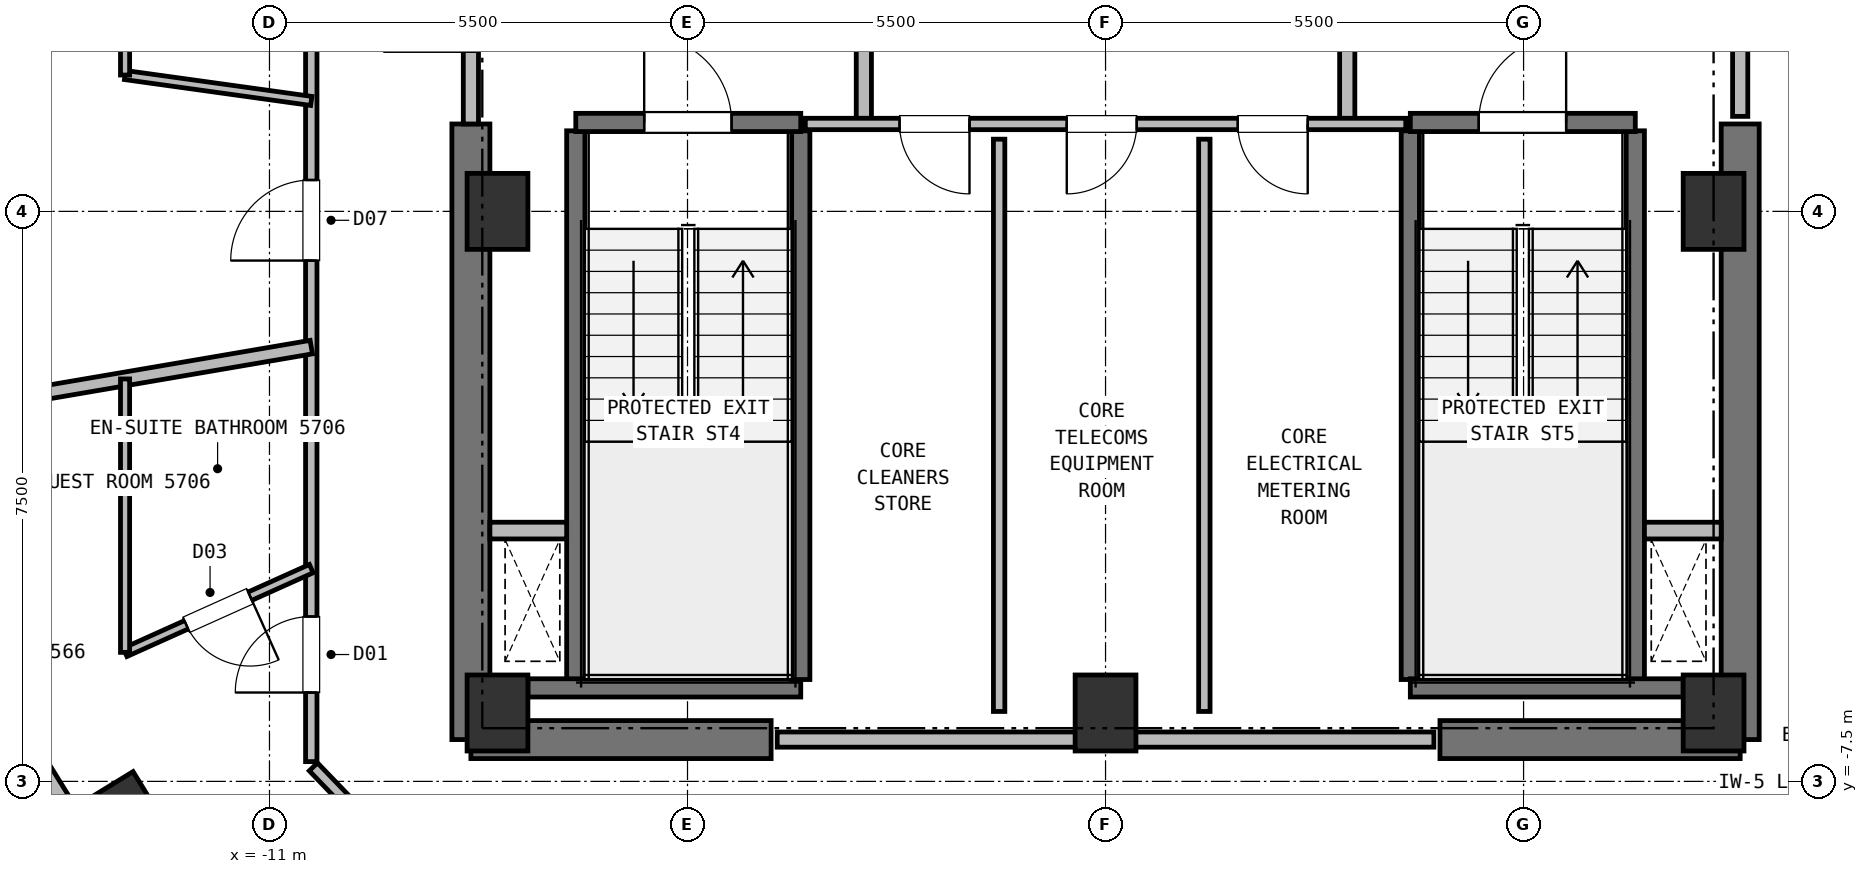
"""IFC4 building model, lengths in metres.
Left out: names, types, materials, properties, quantities, classifications, styles, units other than length and angle.
Written with IfcOpenShell. Run it as: python <this file> out.ifc"""

import sys

from ifc_helpers import new_model, si_unit, direction, frame, frame_2d, origin, origin_2d, place, context, subcontext, project, spatial, rectangle, extrude, element, fill, save


model = new_model("IFC4")
c1 = context("Model", 3, precision=1e-05, world=origin(), true_north=direction((0.0, 1.0)))
c2 = subcontext(c1, "Body", "Model", "MODEL_VIEW")
j1 = project(units=[si_unit("LENGTHUNIT", "METRE"), si_unit("PLANEANGLEUNIT", "RADIAN")], contexts=[c1])
p1 = place(None, origin())
s1 = spatial("IfcSite", under=j1, at=p1, CompositionType="ELEMENT")
p2 = place(p1, origin())
s2 = spatial("IfcBuilding", under=s1, at=p2, CompositionType="ELEMENT")
p3 = place(p2, frame((0.0, 0.0, 216.95)))
s3 = spatial("IfcBuildingStorey", under=s2, at=p3, CompositionType="ELEMENT", Elevation=216.95)
for number, where, z_axis, x_axis in (
    (1, (-8.0, -6.6, 0.0), (0.0, 0.0, 1.0), (1.0, 0.0, 0.0)),
    (2, (0.0, -6.6, 0.0), (0.0, 0.0, 1.0), (1.0, 0.0, 0.0)),
    (3, (8.0, -6.6, 0.0), (0.0, 0.0, 1.0), (1.0, 0.0, 0.0)),
    (4, (8.0, 0.0, 0.0), (0.0, 0.0, 1.0), (1.0, 0.0, 0.0)),
    (5, (-8.0, 0.0, 0.0), (0.0, 0.0, 1.0), (1.0, 0.0, 0.0)),
):
    element("IfcColumn", number, at=place(p3, frame(where, z_axis=z_axis, x_axis=x_axis)), inside=s3, PredefinedType="COLUMN", context=c2, shape_type="SweptSolid", body=[
        extrude(rectangle(XDim=0.8, YDim=1.0, at=origin_2d()), origin(), (0.0, 0.0, 1.0), 3.8),
    ])
for number, where, z_axis, x_axis in (
    (6, (-8.35, -6.95, 0.0), (0.0, 0.0, 1.0), (1.0, 0.0, 0.0)),
    (7, (4.4, -6.95, 0.0), (0.0, 0.0, 1.0), (1.0, 0.0, 0.0)),
):
    element("IfcWall", number, at=place(p3, frame(where, z_axis=z_axis, x_axis=x_axis)), inside=s3, PredefinedType="SHEAR", context=c2, shape_type="SweptSolid", body=[
        extrude(rectangle(XDim=3.95, YDim=0.5, at=frame_2d((1.975, 0.0))), origin(), (0.0, 0.0, 1.0), 3.55),
    ])
for number, where, z_axis, x_axis in (
    (8, (-8.35, -6.95, 0.0), (0.0, 0.0, 1.0), (0.0, 1.0, 0.0)),
    (9, (8.35, -6.95, 0.0), (0.0, 0.0, 1.0), (0.0, 1.0, 0.0)),
):
    element("IfcWall", number, at=place(p3, frame(where, z_axis=z_axis, x_axis=x_axis)), inside=s3, PredefinedType="SHEAR", context=c2, shape_type="SweptSolid", body=[
        extrude(rectangle(XDim=8.1, YDim=0.5, at=frame_2d((4.05, 0.0))), origin(), (0.0, 0.0, 1.0), 3.55),
    ])
p4 = place(p3, frame((-13.012, -7.974, 0.0), z_axis=(0.0, 0.0, 1.0), x_axis=(-0.522498564716, 0.852640164354, 0.0)))
e10 = element("IfcColumn", 10, at=p4, inside=s3, PredefinedType="COLUMN", context=c2, shape_type="SweptSolid", body=[
    extrude(rectangle(XDim=0.8, YDim=1.0, at=origin_2d()), origin(), (0.0, 0.0, 1.0), 3.8),
])
p5 = place(p3, frame((-13.25, -8.634, 0.0), z_axis=(0.0, 0.0, 1.0), x_axis=(-0.526908054593, 0.849922291745, 0.0)))
e11 = element("IfcWall", 11, at=p5, inside=s3, PredefinedType="SOLIDWALL", context=c2, shape_type="SweptSolid", body=[
    extrude(rectangle(XDim=2.566, YDim=0.33, at=frame_2d((1.283, 0.0))), origin(), (0.0, 0.0, 1.0), 3.55),
])
p6 = place(p3, frame((-6.97, -6.16, 0.0), z_axis=(0.0, 0.0, 1.0), x_axis=(0.0, 1.0, 0.0)))
e12 = element("IfcWall", 12, at=p6, inside=s3, PredefinedType="SHEAR", context=c2, shape_type="SweptSolid", body=[
    extrude(rectangle(XDim=7.22, YDim=0.24, at=frame_2d((3.61, 0.0))), origin(), (0.0, 0.0, 1.0), 3.55),
])
p7 = place(p3, frame((-7.6, -6.27, 0.0), z_axis=(0.0, 0.0, 1.0), x_axis=(1.0, 0.0, 0.0)))
e13 = element("IfcWall", 13, at=p7, inside=s3, PredefinedType="SHEAR", context=c2, shape_type="SweptSolid", body=[
    extrude(rectangle(XDim=3.59, YDim=0.24, at=frame_2d((1.795, 0.0))), origin(), (0.0, 0.0, 1.0), 3.55),
])
p8 = place(p3, frame((-4.01, -6.16, 0.0), z_axis=(0.0, 0.0, 1.0), x_axis=(0.0, 1.0, 0.0)))
e14 = element("IfcWall", 14, at=p8, inside=s3, PredefinedType="SHEAR", context=c2, shape_type="SweptSolid", body=[
    extrude(rectangle(XDim=7.22, YDim=0.24, at=frame_2d((3.61, 0.0))), origin(), (0.0, 0.0, 1.0), 3.55),
])
p9 = place(p3, frame((-6.97, 1.17, 0.0), z_axis=(0.0, 0.0, 1.0), x_axis=(1.0, 0.0, 0.0)))
e15 = element("IfcWall", 15, at=p9, inside=s3, PredefinedType="SHEAR", context=c2, shape_type="SweptSolid", body=[
    extrude(rectangle(XDim=2.96, YDim=0.24, at=frame_2d((1.48, 0.0))), origin(), (0.0, 0.0, 1.0), 3.55),
])
p10 = place(p9, frame((0.9, 0.0, 0.0)))
e16 = element("IfcOpeningElement", 16, at=p10, cuts=e15, PredefinedType="OPENING", context=c2, shape_type="SweptSolid", body=[
    extrude(rectangle(XDim=1.15, YDim=2.15, at=frame_2d((0.575, 1.075))), frame((0.0, 0.13, 0.0), z_axis=(0.0, -1.0, 0.0), x_axis=(1.0, 0.0, 0.0)), (0.0, 0.0, 1.0), 0.26),
])
for number, where, z_axis, x_axis in (
    (17, (4.01, -6.16, 0.0), (0.0, 0.0, 1.0), (0.0, 1.0, 0.0)),
    (18, (6.97, -6.16, 0.0), (0.0, 0.0, 1.0), (0.0, 1.0, 0.0)),
):
    element("IfcWall", number, at=place(p3, frame(where, z_axis=z_axis, x_axis=x_axis)), inside=s3, PredefinedType="SHEAR", context=c2, shape_type="SweptSolid", body=[
        extrude(rectangle(XDim=7.22, YDim=0.24, at=frame_2d((3.61, 0.0))), origin(), (0.0, 0.0, 1.0), 3.55),
    ])
p11 = place(p3, frame((4.01, -6.27, 0.0), z_axis=(0.0, 0.0, 1.0), x_axis=(1.0, 0.0, 0.0)))
e19 = element("IfcWall", 19, at=p11, inside=s3, PredefinedType="SHEAR", context=c2, shape_type="SweptSolid", body=[
    extrude(rectangle(XDim=3.59, YDim=0.24, at=frame_2d((1.795, 0.0))), origin(), (0.0, 0.0, 1.0), 3.55),
])
p12 = place(p3, frame((4.01, 1.17, 0.0), z_axis=(0.0, 0.0, 1.0), x_axis=(1.0, 0.0, 0.0)))
e20 = element("IfcWall", 20, at=p12, inside=s3, PredefinedType="SHEAR", context=c2, shape_type="SweptSolid", body=[
    extrude(rectangle(XDim=2.96, YDim=0.24, at=frame_2d((1.48, 0.0))), origin(), (0.0, 0.0, 1.0), 3.55),
])
p13 = place(p12, frame((0.9, 0.0, 0.0)))
e21 = element("IfcOpeningElement", 21, at=p13, cuts=e20, PredefinedType="OPENING", context=c2, shape_type="SweptSolid", body=[
    extrude(rectangle(XDim=1.15, YDim=2.15, at=frame_2d((0.575, 1.075))), frame((0.0, 0.13, 0.0), z_axis=(0.0, -1.0, 0.0), x_axis=(1.0, 0.0, 0.0)), (0.0, 0.0, 1.0), 0.26),
])
for number, where, z_axis, x_axis in (
    (22, (-8.1, -4.2, 0.0), (0.0, 0.0, 1.0), (1.0, 0.0, 0.0)),
    (23, (7.09, -4.2, 0.0), (0.0, 0.0, 1.0), (1.0, 0.0, 0.0)),
):
    element("IfcWall", number, at=place(p3, frame(where, z_axis=z_axis, x_axis=x_axis)), inside=s3, PredefinedType="PARTITIONING", context=c2, shape_type="SweptSolid", body=[
        extrude(rectangle(XDim=1.01, YDim=0.22, at=frame_2d((0.505, 0.0))), origin(), (0.0, 0.0, 1.0), 3.55),
    ])
p14 = place(p3, frame((-3.18, 1.15, 0.0), z_axis=(0.0, 0.0, 1.0), x_axis=(0.0, 1.0, 0.0)))
e24 = element("IfcWall", 24, at=p14, inside=s3, PredefinedType="PARTITIONING", context=c2, shape_type="SweptSolid", body=[
    extrude(rectangle(XDim=3.3, YDim=0.2, at=frame_2d((1.65, 0.0))), origin(), (0.0, 0.0, 1.0), 3.55),
])
p15 = place(p14, frame((1.08, 0.0, 0.0)))
e25 = element("IfcOpeningElement", 25, at=p15, cuts=e24, PredefinedType="OPENING", context=c2, shape_type="SweptSolid", body=[
    extrude(rectangle(XDim=1.15, YDim=2.15, at=frame_2d((0.575, 1.075))), frame((0.0, 0.11, 0.0), z_axis=(0.0, -1.0, 0.0), x_axis=(1.0, 0.0, 0.0)), (0.0, 0.0, 1.0), 0.22),
])
p16 = place(p3, frame((3.18, 1.15, 0.0), z_axis=(0.0, 0.0, 1.0), x_axis=(0.0, 1.0, 0.0)))
e26 = element("IfcWall", 26, at=p16, inside=s3, PredefinedType="PARTITIONING", context=c2, shape_type="SweptSolid", body=[
    extrude(rectangle(XDim=3.3, YDim=0.2, at=frame_2d((1.65, 0.0))), origin(), (0.0, 0.0, 1.0), 3.55),
])
p17 = place(p16, frame((1.08, 0.0, 0.0)))
e27 = element("IfcOpeningElement", 27, at=p17, cuts=e26, PredefinedType="OPENING", context=c2, shape_type="SweptSolid", body=[
    extrude(rectangle(XDim=1.15, YDim=2.15, at=frame_2d((0.575, 1.075))), frame((0.0, 0.11, 0.0), z_axis=(0.0, -1.0, 0.0), x_axis=(1.0, 0.0, 0.0)), (0.0, 0.0, 1.0), 0.22),
])
p18 = place(p3, frame((-8.35, 1.15, 0.0), z_axis=(0.0, 0.0, 1.0), x_axis=(0.0, 1.0, 0.0)))
e28 = element("IfcWall", 28, at=p18, inside=s3, PredefinedType="PARTITIONING", context=c2, shape_type="SweptSolid", body=[
    extrude(rectangle(XDim=5.4, YDim=0.2, at=frame_2d((2.7, 0.0))), origin(), (0.0, 0.0, 1.0), 3.55),
])
p19 = place(p18, frame((0.95, 0.0, 0.0)))
e29 = element("IfcOpeningElement", 29, at=p19, cuts=e28, PredefinedType="OPENING", context=c2, shape_type="SweptSolid", body=[
    extrude(rectangle(XDim=1.15, YDim=2.15, at=frame_2d((0.575, 1.075))), frame((0.0, 0.11, 0.0), z_axis=(0.0, -1.0, 0.0), x_axis=(1.0, 0.0, 0.0)), (0.0, 0.0, 1.0), 0.22),
])
p20 = place(p3, frame((8.35, 1.25, 0.0), z_axis=(0.0, 0.0, 1.0), x_axis=(0.0, 1.0, 0.0)))
e30 = element("IfcWall", 30, at=p20, inside=s3, PredefinedType="PARTITIONING", context=c2, shape_type="SweptSolid", body=[
    extrude(rectangle(XDim=5.3, YDim=0.2, at=frame_2d((2.65, 0.0))), origin(), (0.0, 0.0, 1.0), 3.55),
])
p21 = place(p20, frame((0.95, 0.0, 0.0)))
e31 = element("IfcOpeningElement", 31, at=p21, cuts=e30, PredefinedType="OPENING", context=c2, shape_type="SweptSolid", body=[
    extrude(rectangle(XDim=1.15, YDim=2.15, at=frame_2d((0.575, 1.075))), frame((0.0, 0.11, 0.0), z_axis=(0.0, -1.0, 0.0), x_axis=(1.0, 0.0, 0.0)), (0.0, 0.0, 1.0), 0.22),
])
p22 = place(p3, frame((3.95, 1.15, 0.0), z_axis=(0.0, 0.0, 1.0), x_axis=(-1.0, 0.0, 0.0)))
e32 = element("IfcWall", 32, at=p22, inside=s3, PredefinedType="PARTITIONING", context=c2, shape_type="SweptSolid", body=[
    extrude(rectangle(XDim=7.9, YDim=0.15, at=frame_2d((3.95, 0.0))), origin(), (0.0, 0.0, 1.0), 3.55),
])
p23 = place(p22, frame((5.74, 0.0, 0.0)))
e33 = element("IfcOpeningElement", 33, at=p23, cuts=e32, PredefinedType="OPENING", context=c2, shape_type="SweptSolid", body=[
    extrude(rectangle(XDim=0.92, YDim=2.05, at=frame_2d((0.46, 1.025))), frame((0.0, 0.085, 0.0), z_axis=(0.0, -1.0, 0.0), x_axis=(1.0, 0.0, 0.0)), (0.0, 0.0, 1.0), 0.17),
])
p24 = place(p22, frame((3.54, 0.0, 0.0)))
e34 = element("IfcOpeningElement", 34, at=p24, cuts=e32, PredefinedType="OPENING", context=c2, shape_type="SweptSolid", body=[
    extrude(rectangle(XDim=0.92, YDim=2.05, at=frame_2d((0.46, 1.025))), frame((0.0, 0.085, 0.0), z_axis=(0.0, -1.0, 0.0), x_axis=(1.0, 0.0, 0.0)), (0.0, 0.0, 1.0), 0.17),
])
p25 = place(p22, frame((1.29, 0.0, 0.0)))
e35 = element("IfcOpeningElement", 35, at=p25, cuts=e32, PredefinedType="OPENING", context=c2, shape_type="SweptSolid", body=[
    extrude(rectangle(XDim=0.92, YDim=2.05, at=frame_2d((0.46, 1.025))), frame((0.0, 0.085, 0.0), z_axis=(0.0, -1.0, 0.0), x_axis=(1.0, 0.0, 0.0)), (0.0, 0.0, 1.0), 0.17),
])
p26 = place(p3, frame((-4.32, -6.95, 0.0), z_axis=(0.0, 0.0, 1.0), x_axis=(1.0, 0.0, 0.0)))
e36 = element("IfcWall", 36, at=p26, inside=s3, PredefinedType="PARTITIONING", context=c2, shape_type="SweptSolid", body=[
    extrude(rectangle(XDim=8.64, YDim=0.2, at=frame_2d((4.32, 0.0))), origin(), (0.0, 0.0, 1.0), 3.55),
])
for number, where, z_axis, x_axis in (
    (37, (-1.4, -6.58, 0.0), (0.0, 0.0, 1.0), (0.0, 1.0, 0.0)),
    (38, (1.3, -6.58, 0.0), (0.0, 0.0, 1.0), (0.0, 1.0, 0.0)),
):
    element("IfcWall", number, at=place(p3, frame(where, z_axis=z_axis, x_axis=x_axis)), inside=s3, PredefinedType="PARTITIONING", context=c2, shape_type="SweptSolid", body=[
        extrude(rectangle(XDim=7.53, YDim=0.15, at=frame_2d((3.765, 0.0))), origin(), (0.0, 0.0, 1.0), 3.55),
    ])
p27 = place(p3, frame((10.422, -7.309, 0.0), z_axis=(0.0, 0.0, 1.0), x_axis=(-0.693764562202, -0.720201869085, 0.0)))
e39 = element("IfcWall", 39, at=p27, inside=s3, PredefinedType="PARTITIONING", context=c2, shape_type="SweptSolid", body=[
    extrude(rectangle(XDim=2.558, YDim=0.15, at=frame_2d((1.279, 0.0))), origin(), (0.0, 0.0, 1.0), 3.23),
])
p28 = place(p3, frame((-10.45, -7.24, 0.0), z_axis=(0.0, 0.0, 1.0), x_axis=(0.0, 1.0, 0.0)))
e40 = element("IfcWall", 40, at=p28, inside=s3, PredefinedType="PARTITIONING", context=c2, shape_type="SweptSolid", body=[
    extrude(rectangle(XDim=14.48, YDim=0.15, at=frame_2d((7.24, 0.0))), origin(), (0.0, 0.0, 1.0), 3.23),
])
p29 = place(p28, frame((0.909, 0.0, 0.0)))
e41 = element("IfcOpeningElement", 41, at=p29, cuts=e40, PredefinedType="OPENING", context=c2, shape_type="SweptSolid", body=[
    extrude(rectangle(XDim=1.0, YDim=2.15, at=frame_2d((0.5, 1.075))), frame((0.0, 0.085, 0.0), z_axis=(0.0, -1.0, 0.0), x_axis=(1.0, 0.0, 0.0)), (0.0, 0.0, 1.0), 0.17),
])
p30 = place(p28, frame((6.593, 0.0, 0.0)))
e42 = element("IfcOpeningElement", 42, at=p30, cuts=e40, PredefinedType="OPENING", context=c2, shape_type="SweptSolid", body=[
    extrude(rectangle(XDim=1.06, YDim=2.15, at=frame_2d((0.53, 1.075))), frame((0.0, 0.085, 0.0), z_axis=(0.0, -1.0, 0.0), x_axis=(1.0, 0.0, 0.0)), (0.0, 0.0, 1.0), 0.17),
])
p31 = place(p28, frame((12.49, 0.0, 0.0)))
e43 = element("IfcOpeningElement", 43, at=p31, cuts=e40, PredefinedType="OPENING", context=c2, shape_type="SweptSolid", body=[
    extrude(rectangle(XDim=1.06, YDim=2.15, at=frame_2d((0.53, 1.075))), frame((0.0, 0.085, 0.0), z_axis=(0.0, -1.0, 0.0), x_axis=(1.0, 0.0, 0.0)), (0.0, 0.0, 1.0), 0.17),
])
p32 = place(p3, frame((-8.648, -9.151, 0.0), z_axis=(0.0, 0.0, 1.0), x_axis=(-0.693764562202, 0.720201869085, 0.0)))
e44 = element("IfcWall", 44, at=p32, inside=s3, PredefinedType="PARTITIONING", context=c2, shape_type="SweptSolid", body=[
    extrude(rectangle(XDim=2.558, YDim=0.15, at=frame_2d((1.279, 0.0))), origin(), (0.0, 0.0, 1.0), 3.23),
])
p33 = place(p3, frame((-12.9, 1.794, 0.0), z_axis=(0.0, 0.0, 1.0), x_axis=(0.990475454298, -0.137689412929, 0.0)))
e45 = element("IfcWall", 45, at=p33, inside=s3, PredefinedType="PARTITIONING", context=c2, shape_type="SweptSolid", body=[
    extrude(rectangle(XDim=2.473, YDim=0.12, at=frame_2d((1.237, 0.0))), origin(), (0.0, 0.0, 1.0), 3.55),
])
p34 = place(p3, frame((-12.9, 1.794, 0.0), z_axis=(0.0, 0.0, 1.0), x_axis=(0.0, 1.0, 0.0)))
e46 = element("IfcWall", 46, at=p34, inside=s3, PredefinedType="PARTITIONING", context=c2, shape_type="SweptSolid", body=[
    extrude(rectangle(XDim=3.661, YDim=0.12, at=frame_2d((1.831, 0.0))), origin(), (0.0, 0.0, 1.0), 3.55),
])
p35 = place(p34, frame((1.371, 0.0, 0.0)))
e47 = element("IfcOpeningElement", 47, at=p35, cuts=e46, PredefinedType="OPENING", context=c2, shape_type="SweptSolid", body=[
    extrude(rectangle(XDim=0.92, YDim=2.1, at=frame_2d((0.46, 1.05))), frame((0.0, 0.07, 0.0), z_axis=(0.0, -1.0, 0.0), x_axis=(1.0, 0.0, 0.0)), (0.0, 0.0, 1.0), 0.14),
])
p36 = place(p3, frame((-10.45, -1.786, 0.0), z_axis=(0.0, 0.0, 1.0), x_axis=(-0.985707903362, -0.168463435946, 0.0)))
e48 = element("IfcWall", 48, at=p36, inside=s3, PredefinedType="PARTITIONING", context=c2, shape_type="SweptSolid", body=[
    extrude(rectangle(XDim=6.203, YDim=0.18, at=frame_2d((3.101, 0.0))), origin(), (0.0, 0.0, 1.0), 3.55),
])
p37 = place(p3, frame((-10.45, -4.7, 0.0), z_axis=(0.0, 0.0, 1.0), x_axis=(-0.911981011606, -0.410232415186, 0.0)))
e49 = element("IfcWall", 49, at=p37, inside=s3, PredefinedType="PARTITIONING", context=c2, shape_type="SweptSolid", body=[
    extrude(rectangle(XDim=2.687, YDim=0.12, at=frame_2d((1.343, 0.0))), origin(), (0.0, 0.0, 1.0), 3.55),
])
p38 = place(p37, frame((0.883, 0.0, 0.0)))
e50 = element("IfcOpeningElement", 50, at=p38, cuts=e49, PredefinedType="OPENING", context=c2, shape_type="SweptSolid", body=[
    extrude(rectangle(XDim=0.92, YDim=2.1, at=frame_2d((0.46, 1.05))), frame((0.0, 0.07, 0.0), z_axis=(0.0, -1.0, 0.0), x_axis=(1.0, 0.0, 0.0)), (0.0, 0.0, 1.0), 0.14),
])
p39 = place(p3, frame((-12.9, -2.205, 0.0), z_axis=(0.0, 0.0, 1.0), x_axis=(0.0, -1.0, 0.0)))
e51 = element("IfcWall", 51, at=p39, inside=s3, PredefinedType="PARTITIONING", context=c2, shape_type="SweptSolid", body=[
    extrude(rectangle(XDim=3.598, YDim=0.12, at=frame_2d((1.799, 0.0))), origin(), (0.0, 0.0, 1.0), 3.23),
])
p40 = place(p10, origin())
e52 = element("IfcDoor", 52, at=p40, inside=s3, OperationType="SINGLE_SWING_LEFT", PredefinedType="DOOR", context=c2, shape_type="SweptSolid", body=[
    extrude(rectangle(XDim=1.15, YDim=2.15, at=frame_2d((0.575, 1.075))), frame((0.0, 0.025, 0.0), z_axis=(0.0, -1.0, 0.0), x_axis=(1.0, 0.0, 0.0)), (0.0, 0.0, 1.0), 0.05),
])
fill(e16, e52)
p41 = place(p13, origin())
e53 = element("IfcDoor", 53, at=p41, inside=s3, OperationType="SINGLE_SWING_RIGHT", PredefinedType="DOOR", context=c2, shape_type="SweptSolid", body=[
    extrude(rectangle(XDim=1.15, YDim=2.15, at=frame_2d((0.575, 1.075))), frame((0.0, 0.025, 0.0), z_axis=(0.0, -1.0, 0.0), x_axis=(1.0, 0.0, 0.0)), (0.0, 0.0, 1.0), 0.05),
])
fill(e21, e53)
p42 = place(p19, origin())
e54 = element("IfcDoor", 54, at=p42, inside=s3, OperationType="SINGLE_SWING_LEFT", PredefinedType="DOOR", context=c2, shape_type="SweptSolid", body=[
    extrude(rectangle(XDim=1.15, YDim=2.15, at=frame_2d((0.575, 1.075))), frame((0.0, 0.025, 0.0), z_axis=(0.0, -1.0, 0.0), x_axis=(1.0, 0.0, 0.0)), (0.0, 0.0, 1.0), 0.05),
])
fill(e29, e54)
p43 = place(p23, origin())
e55 = element("IfcDoor", 55, at=p43, inside=s3, OperationType="SINGLE_SWING_LEFT", PredefinedType="DOOR", context=c2, shape_type="SweptSolid", body=[
    extrude(rectangle(XDim=0.92, YDim=2.05, at=frame_2d((0.46, 1.025))), frame((0.0, 0.025, 0.0), z_axis=(0.0, -1.0, 0.0), x_axis=(1.0, 0.0, 0.0)), (0.0, 0.0, 1.0), 0.05),
])
fill(e33, e55)
p44 = place(p24, origin())
e56 = element("IfcDoor", 56, at=p44, inside=s3, OperationType="SINGLE_SWING_RIGHT", PredefinedType="DOOR", context=c2, shape_type="SweptSolid", body=[
    extrude(rectangle(XDim=0.92, YDim=2.05, at=frame_2d((0.46, 1.025))), frame((0.0, 0.025, 0.0), z_axis=(0.0, -1.0, 0.0), x_axis=(1.0, 0.0, 0.0)), (0.0, 0.0, 1.0), 0.05),
])
fill(e34, e56)
p45 = place(p25, origin())
e57 = element("IfcDoor", 57, at=p45, inside=s3, OperationType="SINGLE_SWING_LEFT", PredefinedType="DOOR", context=c2, shape_type="SweptSolid", body=[
    extrude(rectangle(XDim=0.92, YDim=2.05, at=frame_2d((0.46, 1.025))), frame((0.0, 0.025, 0.0), z_axis=(0.0, -1.0, 0.0), x_axis=(1.0, 0.0, 0.0)), (0.0, 0.0, 1.0), 0.05),
])
fill(e35, e57)
p46 = place(p38, origin())
e58 = element("IfcDoor", 58, at=p46, inside=s3, OperationType="SINGLE_SWING_LEFT", PredefinedType="DOOR", context=c2, shape_type="SweptSolid", body=[
    extrude(rectangle(XDim=0.92, YDim=2.1, at=frame_2d((0.46, 1.05))), frame((0.0, 0.025, 0.0), z_axis=(0.0, -1.0, 0.0), x_axis=(1.0, 0.0, 0.0)), (0.0, 0.0, 1.0), 0.05),
])
fill(e50, e58)
p47 = place(p29, origin())
e59 = element("IfcDoor", 59, at=p47, inside=s3, OperationType="SINGLE_SWING_LEFT", PredefinedType="DOOR", context=c2, shape_type="SweptSolid", body=[
    extrude(rectangle(XDim=1.0, YDim=2.15, at=frame_2d((0.5, 1.075))), frame((0.0, 0.025, 0.0), z_axis=(0.0, -1.0, 0.0), x_axis=(1.0, 0.0, 0.0)), (0.0, 0.0, 1.0), 0.05),
])
fill(e41, e59)
p48 = place(p30, origin())
e60 = element("IfcDoor", 60, at=p48, inside=s3, OperationType="SINGLE_SWING_LEFT", PredefinedType="DOOR", context=c2, shape_type="SweptSolid", body=[
    extrude(rectangle(XDim=1.06, YDim=2.15, at=frame_2d((0.53, 1.075))), frame((0.0, 0.025, 0.0), z_axis=(0.0, -1.0, 0.0), x_axis=(1.0, 0.0, 0.0)), (0.0, 0.0, 1.0), 0.05),
])
fill(e42, e60)
save(model, sys.argv[1])
